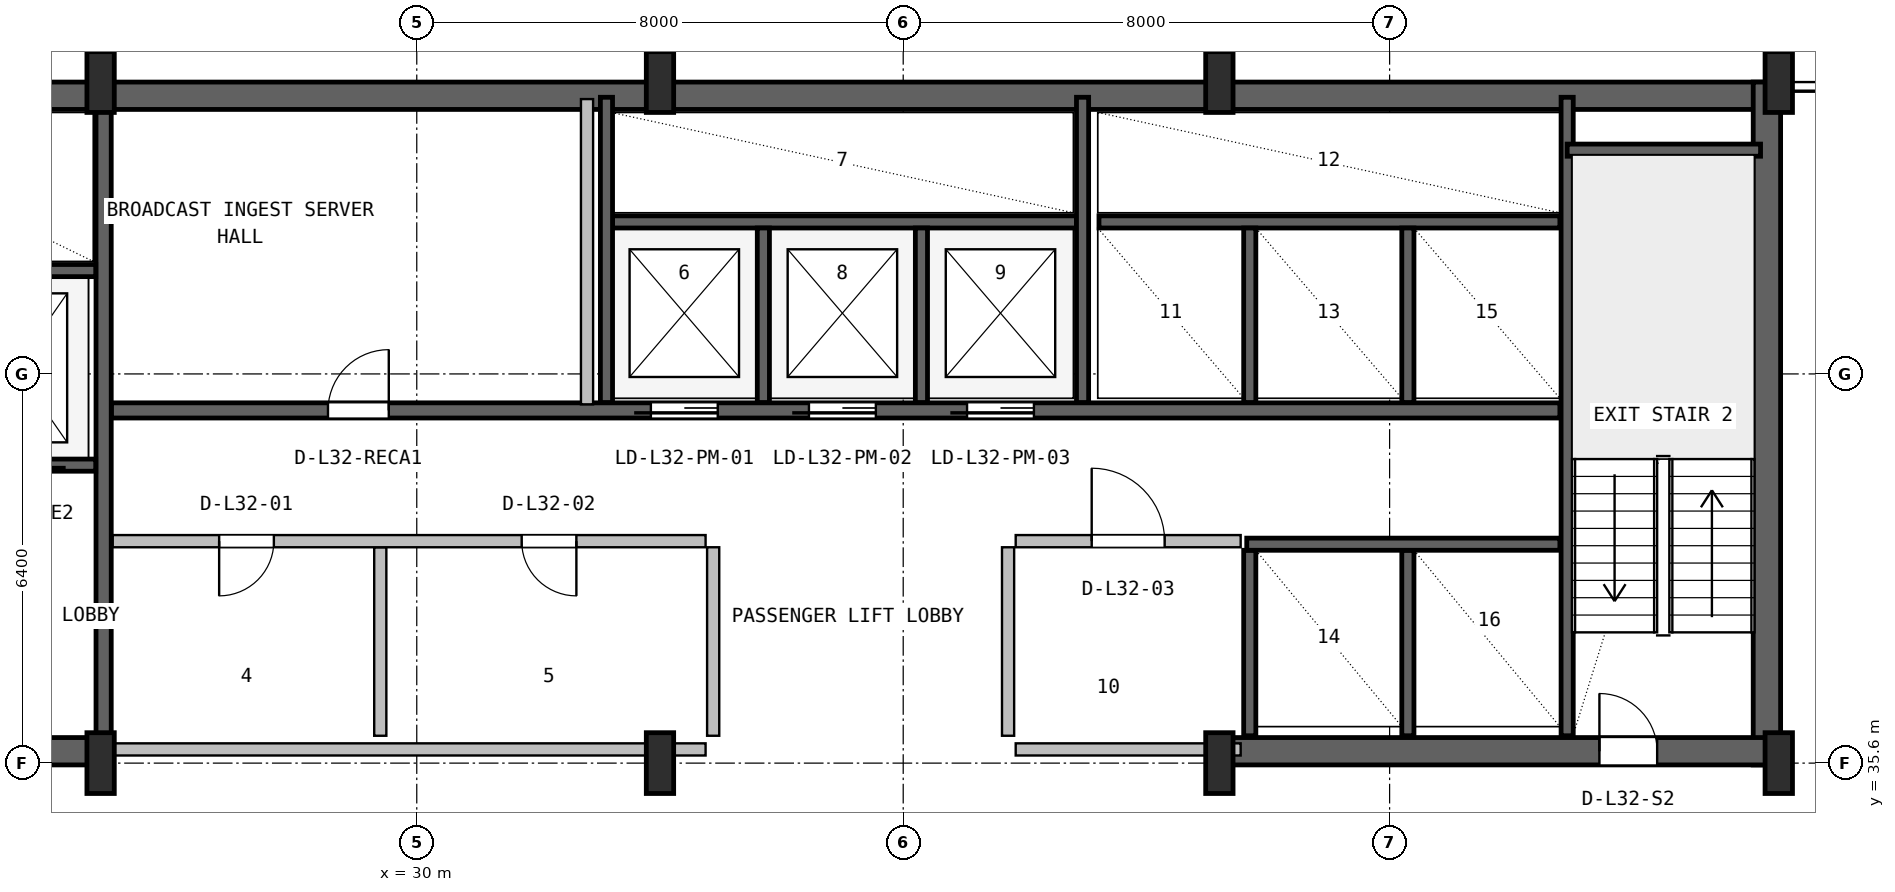
"""IFC4 building model, lengths in metres.
Left out: names, types, materials, properties, quantities, classifications, styles, units other than length and angle.
Written with IfcOpenShell. Run it as: python <this file> out.ifc"""

import sys

from ifc_helpers import new_model, si_unit, direction, frame, frame_2d, origin, origin_2d, place, context, subcontext, project, spatial, rectangle, i_section, extrude, source, transform, mapped, element, fill, save


model = new_model("IFC4")
c1 = context("Model", 3, precision=1e-05, world=origin(), true_north=direction((0.0, 1.0)))
c2 = subcontext(c1, "Body", "Model", "MODEL_VIEW")
j1 = project(units=[si_unit("LENGTHUNIT", "METRE"), si_unit("PLANEANGLEUNIT", "RADIAN")], contexts=[c1])
p1 = place(None, origin())
s1 = spatial("IfcSite", under=j1, at=p1, CompositionType="ELEMENT")
p2 = place(p1, origin())
s2 = spatial("IfcBuilding", under=s1, at=p2, CompositionType="ELEMENT")
p3 = place(p2, frame((0.0, 0.0, 133.4)))
s3 = spatial("IfcBuildingStorey", under=s2, at=p3, CompositionType="ELEMENT", Elevation=133.4)
p4 = place(p3, frame((15.6, 46.575, 0.0), z_axis=(0.0, 0.0, 1.0), x_axis=(1.0, 0.0, 0.0)))
e1 = element("IfcWall", 1, at=p4, inside=s3, PredefinedType="SHEAR", context=c2, shape_type="SweptSolid", body=[
    extrude(rectangle(XDim=36.8, YDim=0.45, at=frame_2d((18.4, 0.0))), origin(), (0.0, 0.0, 1.0), 3.55),
])
p5 = place(p3, frame((52.205, 35.57, 0.0), z_axis=(0.0, 0.0, 1.0), x_axis=(0.0, 1.0, 0.0)))
e2 = element("IfcWall", 2, at=p5, inside=s3, PredefinedType="SHEAR", context=c2, shape_type="SweptSolid", body=[
    extrude(rectangle(XDim=11.23, YDim=0.45, at=frame_2d((5.615, 0.0))), origin(), (0.0, 0.0, 1.0), 3.55),
])
p6 = place(p3, frame((15.57, 35.795, 0.0), z_axis=(0.0, 0.0, 1.0), x_axis=(1.0, 0.0, 0.0)))
e3 = element("IfcWall", 3, at=p6, inside=s3, PredefinedType="SHEAR", context=c2, shape_type="SweptSolid", body=[
    extrude(rectangle(XDim=9.23, YDim=0.45, at=frame_2d((4.615, 0.0))), origin(), (0.0, 0.0, 1.0), 3.55),
])
p7 = place(p6, frame((5.4, 0.0, 0.0)))
e4 = element("IfcOpeningElement", 4, at=p7, cuts=e3, PredefinedType="OPENING", context=c2, shape_type="SweptSolid", body=[
    extrude(rectangle(XDim=1.0, YDim=2.1, at=frame_2d((0.5, 1.05))), frame((0.0, 0.235, 0.0), z_axis=(0.0, -1.0, 0.0), x_axis=(1.0, 0.0, 0.0)), (0.0, 0.0, 1.0), 0.47),
])
p8 = place(p3, frame((43.2, 35.795, 0.0), z_axis=(0.0, 0.0, 1.0), x_axis=(1.0, 0.0, 0.0)))
e5 = element("IfcWall", 5, at=p8, inside=s3, PredefinedType="SHEAR", context=c2, shape_type="SweptSolid", body=[
    extrude(rectangle(XDim=9.23, YDim=0.45, at=frame_2d((4.615, 0.0))), origin(), (0.0, 0.0, 1.0), 3.55),
])
p9 = place(p8, frame((6.25, 0.0, 0.0)))
e6 = element("IfcOpeningElement", 6, at=p9, cuts=e5, PredefinedType="OPENING", context=c2, shape_type="SweptSolid", body=[
    extrude(rectangle(XDim=0.95, YDim=2.1, at=frame_2d((0.475, 1.05))), frame((0.0, 0.235, 0.0), z_axis=(0.0, -1.0, 0.0), x_axis=(1.0, 0.0, 0.0)), (0.0, 0.0, 1.0), 0.47),
])
m1 = source(origin(), c2, "Body", "SweptSolid", [
    extrude(i_section(OverallWidth=0.45, OverallDepth=1.0, WebThickness=0.016, FlangeThickness=0.03, FilletRadius=0.016, at=origin_2d()), origin(), (0.0, 0.0, 1.0), 3.8),
])
for number, where, z_axis, x_axis in (
    (7, (24.8, 35.6, 0.0), (0.0, 0.0, 1.0), (1.0, 0.0, 0.0)),
    (8, (24.8, 46.8, 0.0), (0.0, 0.0, 1.0), (1.0, 0.0, 0.0)),
    (9, (34.0, 35.6, 0.0), (0.0, 0.0, 1.0), (1.0, 0.0, 0.0)),
    (10, (34.0, 46.8, 0.0), (0.0, 0.0, 1.0), (1.0, 0.0, 0.0)),
    (11, (43.2, 35.6, 0.0), (0.0, 0.0, 1.0), (1.0, 0.0, 0.0)),
    (12, (43.2, 46.8, 0.0), (0.0, 0.0, 1.0), (1.0, 0.0, 0.0)),
    (13, (52.4, 35.6, 0.0), (0.0, 0.0, 1.0), (1.0, 0.0, 0.0)),
    (14, (52.4, 46.8, 0.0), (0.0, 0.0, 1.0), (1.0, 0.0, 0.0)),
):
    element("IfcColumn", number, at=place(p3, frame(where, z_axis=z_axis, x_axis=x_axis)), inside=s3, PredefinedType="COLUMN", context=c2, shape_type="MappedRepresentation", body=[
        mapped(m1, transform((0.0, 0.0, 0.0), x_axis=(1.0, 0.0, 0.0), y_axis=(0.0, 1.0, 0.0), z_axis=(0.0, 0.0, 1.0), scale=1.0)),
    ])
p10 = place(p3, frame((24.85, 36.05, 0.0), z_axis=(0.0, 0.0, 1.0), x_axis=(0.0, 1.0, 0.0)))
e15 = element("IfcWall", 15, at=p10, inside=s3, PredefinedType="SHEAR", context=c2, shape_type="SweptSolid", body=[
    extrude(rectangle(XDim=10.45, YDim=0.25, at=frame_2d((5.225, 0.0))), origin(), (0.0, 0.0, 1.0), 3.55),
])
p11 = place(p3, frame((19.2, 40.5, 0.0), z_axis=(0.0, 0.0, 1.0), x_axis=(1.0, 0.0, 0.0)))
e16 = element("IfcWall", 16, at=p11, inside=s3, PredefinedType="SHEAR", context=c2, shape_type="SweptSolid", body=[
    extrude(rectangle(XDim=5.52, YDim=0.2, at=frame_2d((2.76, 0.0))), origin(), (0.0, 0.0, 1.0), 3.55),
])
p12 = place(p11, frame((1.05, 0.0, 0.0)))
e17 = element("IfcOpeningElement", 17, at=p12, cuts=e16, PredefinedType="OPENING", context=c2, shape_type="SweptSolid", body=[
    extrude(rectangle(XDim=1.1, YDim=2.18, at=frame_2d((0.55, 1.09))), frame((0.0, 0.11, 0.0), z_axis=(0.0, -1.0, 0.0), x_axis=(1.0, 0.0, 0.0)), (0.0, 0.0, 1.0), 0.22),
])
p13 = place(p11, frame((3.65, 0.0, 0.0)))
e18 = element("IfcOpeningElement", 18, at=p13, cuts=e16, PredefinedType="OPENING", context=c2, shape_type="SweptSolid", body=[
    extrude(rectangle(XDim=1.1, YDim=2.18, at=frame_2d((0.55, 1.09))), frame((0.0, 0.11, 0.0), z_axis=(0.0, -1.0, 0.0), x_axis=(1.0, 0.0, 0.0)), (0.0, 0.0, 1.0), 0.22),
])
p14 = place(p3, frame((19.2, 43.7, 0.0), z_axis=(0.0, 0.0, 1.0), x_axis=(1.0, 0.0, 0.0)))
e19 = element("IfcWall", 19, at=p14, inside=s3, PredefinedType="SHEAR", context=c2, shape_type="SweptSolid", body=[
    extrude(rectangle(XDim=5.52, YDim=0.2, at=frame_2d((2.76, 0.0))), origin(), (0.0, 0.0, 1.0), 3.55),
])
p15 = place(p3, frame((48.92, 36.05, 0.0), z_axis=(0.0, 0.0, 1.0), x_axis=(0.0, 1.0, 0.0)))
e20 = element("IfcWall", 20, at=p15, inside=s3, PredefinedType="SHEAR", context=c2, shape_type="SweptSolid", body=[
    extrude(rectangle(XDim=10.5, YDim=0.2, at=frame_2d((5.25, 0.0))), origin(), (0.0, 0.0, 1.0), 3.55),
])
p16 = place(p3, frame((48.92, 45.68, 0.0), z_axis=(0.0, 0.0, 1.0), x_axis=(1.0, 0.0, 0.0)))
e21 = element("IfcWall", 21, at=p16, inside=s3, PredefinedType="SHEAR", context=c2, shape_type="SweptSolid", body=[
    extrude(rectangle(XDim=3.18, YDim=0.2, at=frame_2d((1.59, 0.0))), origin(), (0.0, 0.0, 1.0), 3.55),
])
p17 = place(p3, frame((24.98, 41.4, 0.0), z_axis=(0.0, 0.0, 1.0), x_axis=(1.0, 0.0, 0.0)))
e22 = element("IfcWall", 22, at=p17, inside=s3, PredefinedType="SHEAR", context=c2, shape_type="SweptSolid", body=[
    extrude(rectangle(XDim=23.82, YDim=0.25, at=frame_2d((11.91, 0.0))), origin(), (0.0, 0.0, 1.0), 3.55),
])
p18 = place(p17, frame((8.87, 0.0, 0.0)))
e23 = element("IfcOpeningElement", 23, at=p18, cuts=e22, PredefinedType="OPENING", context=c2, shape_type="SweptSolid", body=[
    extrude(rectangle(XDim=1.1, YDim=2.18, at=frame_2d((0.55, 1.09))), frame((0.0, 0.135, 0.0), z_axis=(0.0, -1.0, 0.0), x_axis=(1.0, 0.0, 0.0)), (0.0, 0.0, 1.0), 0.27),
])
p19 = place(p17, frame((11.47, 0.0, 0.0)))
e24 = element("IfcOpeningElement", 24, at=p19, cuts=e22, PredefinedType="OPENING", context=c2, shape_type="SweptSolid", body=[
    extrude(rectangle(XDim=1.1, YDim=2.18, at=frame_2d((0.55, 1.09))), frame((0.0, 0.135, 0.0), z_axis=(0.0, -1.0, 0.0), x_axis=(1.0, 0.0, 0.0)), (0.0, 0.0, 1.0), 0.27),
])
p20 = place(p17, frame((14.07, 0.0, 0.0)))
e25 = element("IfcOpeningElement", 25, at=p20, cuts=e22, PredefinedType="OPENING", context=c2, shape_type="SweptSolid", body=[
    extrude(rectangle(XDim=1.1, YDim=2.18, at=frame_2d((0.55, 1.09))), frame((0.0, 0.135, 0.0), z_axis=(0.0, -1.0, 0.0), x_axis=(1.0, 0.0, 0.0)), (0.0, 0.0, 1.0), 0.27),
])
p21 = place(p17, frame((3.56, 0.0, 0.0)))
e26 = element("IfcOpeningElement", 26, at=p21, cuts=e22, PredefinedType="OPENING", context=c2, shape_type="SweptSolid", body=[
    extrude(rectangle(XDim=1.0, YDim=2.08, at=frame_2d((0.5, 1.04))), frame((0.0, 0.135, 0.0), z_axis=(0.0, -1.0, 0.0), x_axis=(1.0, 0.0, 0.0)), (0.0, 0.0, 1.0), 0.27),
])
p22 = place(p3, frame((33.22, 44.5, 0.0), z_axis=(0.0, 0.0, 1.0), x_axis=(1.0, 0.0, 0.0)))
e27 = element("IfcWall", 27, at=p22, inside=s3, PredefinedType="SHEAR", context=c2, shape_type="SweptSolid", body=[
    extrude(rectangle(XDim=7.63, YDim=0.2, at=frame_2d((3.815, 0.0))), origin(), (0.0, 0.0, 1.0), 3.55),
])
p23 = place(p3, frame((33.12, 41.53, 0.0), z_axis=(0.0, 0.0, 1.0), x_axis=(0.0, 1.0, 0.0)))
e28 = element("IfcWall", 28, at=p23, inside=s3, PredefinedType="SHEAR", context=c2, shape_type="SweptSolid", body=[
    extrude(rectangle(XDim=5.02, YDim=0.2, at=frame_2d((2.51, 0.0))), origin(), (0.0, 0.0, 1.0), 3.55),
])
for number, where, z_axis, x_axis in (
    (29, (35.7, 41.53, 0.0), (0.0, 0.0, 1.0), (0.0, 1.0, 0.0)),
    (30, (38.3, 41.53, 0.0), (0.0, 0.0, 1.0), (0.0, 1.0, 0.0)),
):
    element("IfcWall", number, at=place(p3, frame(where, z_axis=z_axis, x_axis=x_axis)), inside=s3, PredefinedType="SHEAR", context=c2, shape_type="SweptSolid", body=[
        extrude(rectangle(XDim=2.87, YDim=0.2, at=frame_2d((1.435, 0.0))), origin(), (0.0, 0.0, 1.0), 3.55),
    ])
p24 = place(p3, frame((40.95, 41.53, 0.0), z_axis=(0.0, 0.0, 1.0), x_axis=(0.0, 1.0, 0.0)))
e31 = element("IfcWall", 31, at=p24, inside=s3, PredefinedType="SHEAR", context=c2, shape_type="SweptSolid", body=[
    extrude(rectangle(XDim=5.02, YDim=0.2, at=frame_2d((2.51, 0.0))), origin(), (0.0, 0.0, 1.0), 3.55),
])
p25 = place(p3, frame((41.22, 44.5, 0.0), z_axis=(0.0, 0.0, 1.0), x_axis=(1.0, 0.0, 0.0)))
e32 = element("IfcWall", 32, at=p25, inside=s3, PredefinedType="SHEAR", context=c2, shape_type="SweptSolid", body=[
    extrude(rectangle(XDim=7.58, YDim=0.2, at=frame_2d((3.79, 0.0))), origin(), (0.0, 0.0, 1.0), 3.55),
])
for number, where, z_axis, x_axis in (
    (33, (43.7, 41.53, 0.0), (0.0, 0.0, 1.0), (0.0, 1.0, 0.0)),
    (34, (46.3, 41.53, 0.0), (0.0, 0.0, 1.0), (0.0, 1.0, 0.0)),
):
    element("IfcWall", number, at=place(p3, frame(where, z_axis=z_axis, x_axis=x_axis)), inside=s3, PredefinedType="SHEAR", context=c2, shape_type="SweptSolid", body=[
        extrude(rectangle(XDim=2.87, YDim=0.2, at=frame_2d((1.435, 0.0))), origin(), (0.0, 0.0, 1.0), 3.55),
    ])
for number, where, z_axis, x_axis in (
    (35, (43.7, 36.05, 0.0), (0.0, 0.0, 1.0), (0.0, 1.0, 0.0)),
    (36, (46.3, 36.05, 0.0), (0.0, 0.0, 1.0), (0.0, 1.0, 0.0)),
):
    element("IfcWall", number, at=place(p3, frame(where, z_axis=z_axis, x_axis=x_axis)), inside=s3, PredefinedType="SHEAR", context=c2, shape_type="SweptSolid", body=[
        extrude(rectangle(XDim=3.05, YDim=0.2, at=frame_2d((1.525, 0.0))), origin(), (0.0, 0.0, 1.0), 3.55),
    ])
p26 = place(p3, frame((43.65, 39.2, 0.0), z_axis=(0.0, 0.0, 1.0), x_axis=(1.0, 0.0, 0.0)))
e37 = element("IfcWall", 37, at=p26, inside=s3, PredefinedType="SHEAR", context=c2, shape_type="SweptSolid", body=[
    extrude(rectangle(XDim=5.15, YDim=0.2, at=frame_2d((2.575, 0.0))), origin(), (0.0, 0.0, 1.0), 3.55),
])
p27 = place(p3, frame((25.0, 35.825, 0.0), z_axis=(0.0, 0.0, 1.0), x_axis=(1.0, 0.0, 0.0)))
e38 = element("IfcWall", 38, at=p27, inside=s3, PredefinedType="PLUMBINGWALL", context=c2, shape_type="SweptSolid", body=[
    extrude(rectangle(XDim=9.75, YDim=0.2, at=frame_2d((4.875, 0.0))), origin(), (0.0, 0.0, 1.0), 2.325),
])
p28 = place(p3, frame((29.4, 36.05, 0.0), z_axis=(0.0, 0.0, 1.0), x_axis=(0.0, 1.0, 0.0)))
e39 = element("IfcWall", 39, at=p28, inside=s3, PredefinedType="PLUMBINGWALL", context=c2, shape_type="SweptSolid", body=[
    extrude(rectangle(XDim=3.1, YDim=0.2, at=frame_2d((1.55, 0.0))), origin(), (0.0, 0.0, 1.0), 3.53),
])
p29 = place(p3, frame((25.0, 39.25, 0.0), z_axis=(0.0, 0.0, 1.0), x_axis=(1.0, 0.0, 0.0)))
e40 = element("IfcWall", 40, at=p29, inside=s3, PredefinedType="PLUMBINGWALL", context=c2, shape_type="SweptSolid", body=[
    extrude(rectangle(XDim=9.75, YDim=0.2, at=frame_2d((4.875, 0.0))), origin(), (0.0, 0.0, 1.0), 3.53),
])
p30 = place(p29, frame((1.75, 0.0, 0.0)))
e41 = element("IfcOpeningElement", 41, at=p30, cuts=e40, PredefinedType="OPENING", context=c2, shape_type="SweptSolid", body=[
    extrude(rectangle(XDim=0.9, YDim=2.06, at=frame_2d((0.45, 1.03))), frame((0.0, 0.11, 0.0), z_axis=(0.0, -1.0, 0.0), x_axis=(1.0, 0.0, 0.0)), (0.0, 0.0, 1.0), 0.22),
])
p31 = place(p29, frame((6.725, 0.0, 0.0)))
e42 = element("IfcOpeningElement", 42, at=p31, cuts=e40, PredefinedType="OPENING", context=c2, shape_type="SweptSolid", body=[
    extrude(rectangle(XDim=0.9, YDim=2.06, at=frame_2d((0.45, 1.03))), frame((0.0, 0.11, 0.0), z_axis=(0.0, -1.0, 0.0), x_axis=(1.0, 0.0, 0.0)), (0.0, 0.0, 1.0), 0.22),
])
p32 = place(p3, frame((34.875, 36.05, 0.0), z_axis=(0.0, 0.0, 1.0), x_axis=(0.0, 1.0, 0.0)))
e43 = element("IfcWall", 43, at=p32, inside=s3, PredefinedType="PLUMBINGWALL", context=c2, shape_type="SweptSolid", body=[
    extrude(rectangle(XDim=3.1, YDim=0.2, at=frame_2d((1.55, 0.0))), origin(), (0.0, 0.0, 1.0), 3.53),
])
p33 = place(p3, frame((39.85, 35.825, 0.0), z_axis=(0.0, 0.0, 1.0), x_axis=(1.0, 0.0, 0.0)))
e44 = element("IfcWall", 44, at=p33, inside=s3, PredefinedType="SOLIDWALL", context=c2, shape_type="SweptSolid", body=[
    extrude(rectangle(XDim=3.7, YDim=0.2, at=frame_2d((1.85, 0.0))), origin(), (0.0, 0.0, 1.0), 2.325),
])
p34 = place(p3, frame((39.85, 39.25, 0.0), z_axis=(0.0, 0.0, 1.0), x_axis=(1.0, 0.0, 0.0)))
e45 = element("IfcWall", 45, at=p34, inside=s3, PredefinedType="SOLIDWALL", context=c2, shape_type="SweptSolid", body=[
    extrude(rectangle(XDim=3.7, YDim=0.2, at=frame_2d((1.85, 0.0))), origin(), (0.0, 0.0, 1.0), 3.53),
])
p35 = place(p34, frame((1.25, 0.0, 0.0)))
e46 = element("IfcOpeningElement", 46, at=p35, cuts=e45, PredefinedType="OPENING", context=c2, shape_type="SweptSolid", body=[
    extrude(rectangle(XDim=1.2, YDim=2.1, at=frame_2d((0.6, 1.05))), frame((0.0, 0.11, 0.0), z_axis=(0.0, -1.0, 0.0), x_axis=(1.0, 0.0, 0.0)), (0.0, 0.0, 1.0), 0.22),
])
p36 = place(p3, frame((39.725, 36.05, 0.0), z_axis=(0.0, 0.0, 1.0), x_axis=(0.0, 1.0, 0.0)))
e47 = element("IfcWall", 47, at=p36, inside=s3, PredefinedType="SOLIDWALL", context=c2, shape_type="SweptSolid", body=[
    extrude(rectangle(XDim=3.1, YDim=0.2, at=frame_2d((1.55, 0.0))), origin(), (0.0, 0.0, 1.0), 3.53),
])
p37 = place(p3, frame((32.8, 41.5, 0.0), z_axis=(0.0, 0.0, 1.0), x_axis=(0.0, 1.0, 0.0)))
e48 = element("IfcWall", 48, at=p37, inside=s3, PredefinedType="SOLIDWALL", context=c2, shape_type="SweptSolid", body=[
    extrude(rectangle(XDim=5.02, YDim=0.2, at=frame_2d((2.51, 0.0))), origin(), (0.0, 0.0, 1.0), 3.53),
])
m2 = source(origin(), c2, "Body", "SweptSolid", [
    extrude(rectangle(XDim=0.95, YDim=2.1, at=frame_2d((0.475, 1.05))), frame((0.0, 0.025, 0.0), z_axis=(0.0, -1.0, 0.0), x_axis=(1.0, 0.0, 0.0)), (0.0, 0.0, 1.0), 0.05),
])
p38 = place(p9, origin())
e49 = element("IfcDoor", 49, at=p38, inside=s3, OperationType="SINGLE_SWING_LEFT", PredefinedType="DOOR", context=c2, shape_type="MappedRepresentation", body=[
    mapped(m2, transform((0.0, 0.0, 0.0), x_axis=(1.0, 0.0, 0.0), y_axis=(0.0, 1.0, 0.0), z_axis=(0.0, 0.0, 1.0), scale=1.0)),
])
fill(e6, e49)
m3 = source(origin(), c2, "Body", "SweptSolid", [
    extrude(rectangle(XDim=1.1, YDim=2.18, at=frame_2d((0.55, 1.09))), frame((0.0, 0.025, 0.0), z_axis=(0.0, -1.0, 0.0), x_axis=(1.0, 0.0, 0.0)), (0.0, 0.0, 1.0), 0.05),
])
p39 = place(p18, frame((1.1, 0.0, 0.0), z_axis=(0.0, 0.0, 1.0), x_axis=(-1.0, 0.0, 0.0)))
e50 = element("IfcDoor", 50, at=p39, inside=s3, OperationType="SLIDING_TO_LEFT", PredefinedType="DOOR", context=c2, shape_type="MappedRepresentation", body=[
    mapped(m3, transform((0.0, 0.0, 0.0), x_axis=(1.0, 0.0, 0.0), y_axis=(0.0, 1.0, 0.0), z_axis=(0.0, 0.0, 1.0), scale=1.0)),
])
fill(e23, e50)
p40 = place(p19, frame((1.1, 0.0, 0.0), z_axis=(0.0, 0.0, 1.0), x_axis=(-1.0, 0.0, 0.0)))
e51 = element("IfcDoor", 51, at=p40, inside=s3, OperationType="SLIDING_TO_LEFT", PredefinedType="DOOR", context=c2, shape_type="MappedRepresentation", body=[
    mapped(m3, transform((0.0, 0.0, 0.0), x_axis=(1.0, 0.0, 0.0), y_axis=(0.0, 1.0, 0.0), z_axis=(0.0, 0.0, 1.0), scale=1.0)),
])
fill(e24, e51)
p41 = place(p20, frame((1.1, 0.0, 0.0), z_axis=(0.0, 0.0, 1.0), x_axis=(-1.0, 0.0, 0.0)))
e52 = element("IfcDoor", 52, at=p41, inside=s3, OperationType="SLIDING_TO_LEFT", PredefinedType="DOOR", context=c2, shape_type="MappedRepresentation", body=[
    mapped(m3, transform((0.0, 0.0, 0.0), x_axis=(1.0, 0.0, 0.0), y_axis=(0.0, 1.0, 0.0), z_axis=(0.0, 0.0, 1.0), scale=1.0)),
])
fill(e25, e52)
m4 = source(origin(), c2, "Body", "SweptSolid", [
    extrude(rectangle(XDim=1.0, YDim=2.08, at=frame_2d((0.5, 1.04))), frame((0.0, 0.025, 0.0), z_axis=(0.0, -1.0, 0.0), x_axis=(1.0, 0.0, 0.0)), (0.0, 0.0, 1.0), 0.05),
])
p42 = place(p21, origin())
e53 = element("IfcDoor", 53, at=p42, inside=s3, OperationType="SINGLE_SWING_RIGHT", PredefinedType="DOOR", context=c2, shape_type="MappedRepresentation", body=[
    mapped(m4, transform((0.0, 0.0, 0.0), x_axis=(1.0, 0.0, 0.0), y_axis=(0.0, 1.0, 0.0), z_axis=(0.0, 0.0, 1.0), scale=1.0)),
])
fill(e26, e53)
m5 = source(origin(), c2, "Body", "SweptSolid", [
    extrude(rectangle(XDim=0.9, YDim=2.06, at=frame_2d((0.45, 1.03))), frame((0.0, 0.025, 0.0), z_axis=(0.0, -1.0, 0.0), x_axis=(1.0, 0.0, 0.0)), (0.0, 0.0, 1.0), 0.05),
])
p43 = place(p30, frame((0.9, 0.0, 0.0), z_axis=(0.0, 0.0, 1.0), x_axis=(-1.0, 0.0, 0.0)))
e54 = element("IfcDoor", 54, at=p43, inside=s3, OperationType="SINGLE_SWING_LEFT", PredefinedType="DOOR", context=c2, shape_type="MappedRepresentation", body=[
    mapped(m5, transform((0.0, 0.0, 0.0), x_axis=(1.0, 0.0, 0.0), y_axis=(0.0, 1.0, 0.0), z_axis=(0.0, 0.0, 1.0), scale=1.0)),
])
fill(e41, e54)
p44 = place(p31, frame((0.9, 0.0, 0.0), z_axis=(0.0, 0.0, 1.0), x_axis=(-1.0, 0.0, 0.0)))
e55 = element("IfcDoor", 55, at=p44, inside=s3, OperationType="SINGLE_SWING_RIGHT", PredefinedType="DOOR", context=c2, shape_type="MappedRepresentation", body=[
    mapped(m5, transform((0.0, 0.0, 0.0), x_axis=(1.0, 0.0, 0.0), y_axis=(0.0, 1.0, 0.0), z_axis=(0.0, 0.0, 1.0), scale=1.0)),
])
fill(e42, e55)
m6 = source(origin(), c2, "Body", "SweptSolid", [
    extrude(rectangle(XDim=1.2, YDim=2.1, at=frame_2d((0.6, 1.05))), frame((0.0, 0.025, 0.0), z_axis=(0.0, -1.0, 0.0), x_axis=(1.0, 0.0, 0.0)), (0.0, 0.0, 1.0), 0.05),
])
p45 = place(p35, origin())
e56 = element("IfcDoor", 56, at=p45, inside=s3, OperationType="SINGLE_SWING_LEFT", PredefinedType="DOOR", context=c2, shape_type="MappedRepresentation", body=[
    mapped(m6, transform((0.0, 0.0, 0.0), x_axis=(1.0, 0.0, 0.0), y_axis=(0.0, 1.0, 0.0), z_axis=(0.0, 0.0, 1.0), scale=1.0)),
])
fill(e46, e56)
save(model, sys.argv[1])
